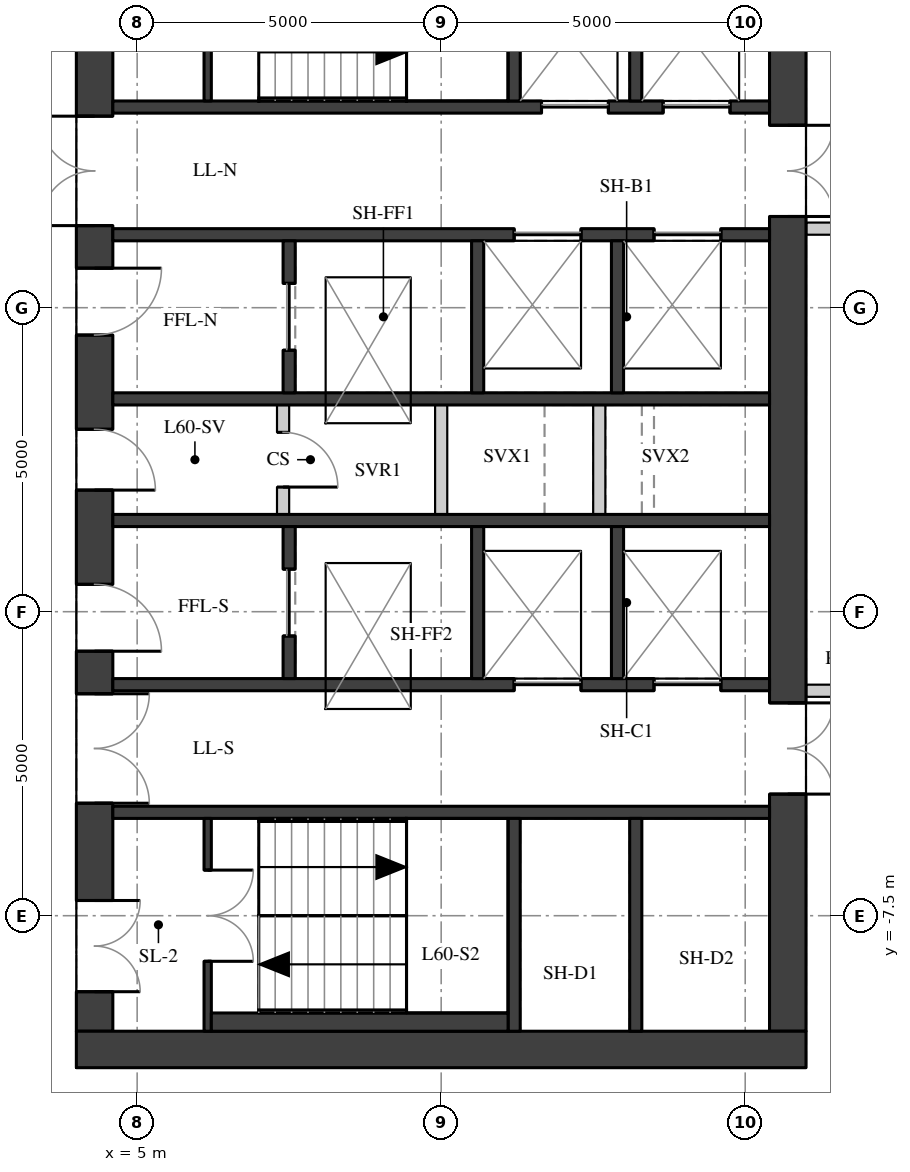
"""IFC4 building model, lengths in metres.
Left out: names, types, materials, properties, quantities, classifications, styles, units other than length and angle.
Written with IfcOpenShell. Run it as: python <this file> out.ifc"""

import sys

from ifc_helpers import new_model, si_unit, direction, frame, frame_2d, origin, place, context, subcontext, project, spatial, rectangle, extrude, element, fill, save


model = new_model("IFC4")
c1 = context("Model", 3, precision=1e-05, world=origin(), true_north=direction((0.0, 1.0)))
c2 = subcontext(c1, "Body", "Model", "MODEL_VIEW")
j1 = project(units=[si_unit("LENGTHUNIT", "METRE"), si_unit("PLANEANGLEUNIT", "RADIAN")], contexts=[c1])
p1 = place(None, origin())
s1 = spatial("IfcSite", under=j1, at=p1, CompositionType="ELEMENT")
p2 = place(p1, origin())
s2 = spatial("IfcBuilding", under=s1, at=p2, CompositionType="ELEMENT")
p3 = place(p2, frame((0.0, 0.0, 212.3)))
s3 = spatial("IfcBuildingStorey", under=s2, at=p3, CompositionType="ELEMENT", Elevation=212.3)
p4 = place(p3, frame((4.3, -9.4, 0.0), z_axis=(0.0, 0.0, 1.0), x_axis=(0.0, 1.0, 0.0)))
e1 = element("IfcWall", 1, at=p4, inside=s3, PredefinedType="SHEAR", context=c2, shape_type="SweptSolid", body=[
    extrude(rectangle(XDim=18.8, YDim=0.6, at=frame_2d((9.4, 0.0))), origin(), (0.0, 0.0, 1.0), 3.02),
])
p5 = place(p4, frame((0.65, 0.0, 0.0)))
e2 = element("IfcOpeningElement", 2, at=p5, cuts=e1, PredefinedType="OPENING", context=c2, shape_type="SweptSolid", body=[
    extrude(rectangle(XDim=1.5, YDim=2.1, at=frame_2d((0.75, 1.05))), frame((0.0, 0.31, 0.0), z_axis=(0.0, -1.0, 0.0), x_axis=(1.0, 0.0, 0.0)), (0.0, 0.0, 1.0), 0.62),
])
p6 = place(p4, frame((3.75, 0.0, 0.0)))
e3 = element("IfcOpeningElement", 3, at=p6, cuts=e1, PredefinedType="OPENING", context=c2, shape_type="SweptSolid", body=[
    extrude(rectangle(XDim=1.8, YDim=2.1, at=frame_2d((0.9, 1.05))), frame((0.0, 0.31, 0.0), z_axis=(0.0, -1.0, 0.0), x_axis=(1.0, 0.0, 0.0)), (0.0, 0.0, 1.0), 0.62),
])
p7 = place(p4, frame((6.25, 0.0, 0.0)))
e4 = element("IfcOpeningElement", 4, at=p7, cuts=e1, PredefinedType="OPENING", context=c2, shape_type="SweptSolid", body=[
    extrude(rectangle(XDim=1.1, YDim=2.1, at=frame_2d((0.55, 1.05))), frame((0.0, 0.31, 0.0), z_axis=(0.0, -1.0, 0.0), x_axis=(1.0, 0.0, 0.0)), (0.0, 0.0, 1.0), 0.62),
])
p8 = place(p4, frame((8.9, 0.0, 0.0)))
e5 = element("IfcOpeningElement", 5, at=p8, cuts=e1, PredefinedType="OPENING", context=c2, shape_type="SweptSolid", body=[
    extrude(rectangle(XDim=1.0, YDim=2.1, at=frame_2d((0.5, 1.05))), frame((0.0, 0.31, 0.0), z_axis=(0.0, -1.0, 0.0), x_axis=(1.0, 0.0, 0.0)), (0.0, 0.0, 1.0), 0.62),
])
p9 = place(p4, frame((11.45, 0.0, 0.0)))
e6 = element("IfcOpeningElement", 6, at=p9, cuts=e1, PredefinedType="OPENING", context=c2, shape_type="SweptSolid", body=[
    extrude(rectangle(XDim=1.1, YDim=2.1, at=frame_2d((0.55, 1.05))), frame((0.0, 0.31, 0.0), z_axis=(0.0, -1.0, 0.0), x_axis=(1.0, 0.0, 0.0)), (0.0, 0.0, 1.0), 0.62),
])
p10 = place(p4, frame((13.25, 0.0, 0.0)))
e7 = element("IfcOpeningElement", 7, at=p10, cuts=e1, PredefinedType="OPENING", context=c2, shape_type="SweptSolid", body=[
    extrude(rectangle(XDim=1.8, YDim=2.1, at=frame_2d((0.9, 1.05))), frame((0.0, 0.31, 0.0), z_axis=(0.0, -1.0, 0.0), x_axis=(1.0, 0.0, 0.0)), (0.0, 0.0, 1.0), 0.62),
])
p11 = place(p4, frame((16.65, 0.0, 0.0)))
e8 = element("IfcOpeningElement", 8, at=p11, cuts=e1, PredefinedType="OPENING", context=c2, shape_type="SweptSolid", body=[
    extrude(rectangle(XDim=1.5, YDim=2.1, at=frame_2d((0.75, 1.05))), frame((0.0, 0.31, 0.0), z_axis=(0.0, -1.0, 0.0), x_axis=(1.0, 0.0, 0.0)), (0.0, 0.0, 1.0), 0.62),
])
p12 = place(p3, frame((15.7, -9.4, 0.0), z_axis=(0.0, 0.0, 1.0), x_axis=(0.0, 1.0, 0.0)))
e9 = element("IfcWall", 9, at=p12, inside=s3, PredefinedType="SHEAR", context=c2, shape_type="SweptSolid", body=[
    extrude(rectangle(XDim=18.8, YDim=0.6, at=frame_2d((9.4, 0.0))), origin(), (0.0, 0.0, 1.0), 3.02),
])
p13 = place(p12, frame((13.4, 0.0, 0.0)))
e10 = element("IfcOpeningElement", 10, at=p13, cuts=e9, PredefinedType="OPENING", context=c2, shape_type="SweptSolid", body=[
    extrude(rectangle(XDim=1.5, YDim=2.1, at=frame_2d((0.75, 1.05))), frame((0.0, 0.31, 0.0), z_axis=(0.0, -1.0, 0.0), x_axis=(1.0, 0.0, 0.0)), (0.0, 0.0, 1.0), 0.62),
])
p14 = place(p12, frame((3.9, 0.0, 0.0)))
e11 = element("IfcOpeningElement", 11, at=p14, cuts=e9, PredefinedType="OPENING", context=c2, shape_type="SweptSolid", body=[
    extrude(rectangle(XDim=1.5, YDim=2.1, at=frame_2d((0.75, 1.05))), frame((0.0, 0.31, 0.0), z_axis=(0.0, -1.0, 0.0), x_axis=(1.0, 0.0, 0.0)), (0.0, 0.0, 1.0), 0.62),
])
p15 = place(p3, frame((4.0, -9.7, 0.0), z_axis=(0.0, 0.0, 1.0), x_axis=(1.0, 0.0, 0.0)))
e12 = element("IfcWall", 12, at=p15, inside=s3, PredefinedType="SHEAR", context=c2, shape_type="SweptSolid", body=[
    extrude(rectangle(XDim=12.0, YDim=0.6, at=frame_2d((6.0, 0.0))), origin(), (0.0, 0.0, 1.0), 3.02),
])
p16 = place(p3, frame((4.6, 5.8, 0.0), z_axis=(0.0, 0.0, 1.0), x_axis=(1.0, 0.0, 0.0)))
e13 = element("IfcWall", 13, at=p16, inside=s3, PredefinedType="SHEAR", context=c2, shape_type="SweptSolid", body=[
    extrude(rectangle(XDim=10.8, YDim=0.2, at=frame_2d((5.4, 0.0))), origin(), (0.0, 0.0, 1.0), 3.02),
])
p17 = place(p16, frame((7.05, 0.0, 0.0)))
e14 = element("IfcOpeningElement", 14, at=p17, cuts=e13, PredefinedType="OPENING", context=c2, shape_type="SweptSolid", body=[
    extrude(rectangle(XDim=1.1, YDim=2.1, at=frame_2d((0.55, 1.05))), frame((0.0, 0.11, 0.0), z_axis=(0.0, -1.0, 0.0), x_axis=(1.0, 0.0, 0.0)), (0.0, 0.0, 1.0), 0.22),
])
p18 = place(p16, frame((9.05, 0.0, 0.0)))
e15 = element("IfcOpeningElement", 15, at=p18, cuts=e13, PredefinedType="OPENING", context=c2, shape_type="SweptSolid", body=[
    extrude(rectangle(XDim=1.1, YDim=2.1, at=frame_2d((0.55, 1.05))), frame((0.0, 0.11, 0.0), z_axis=(0.0, -1.0, 0.0), x_axis=(1.0, 0.0, 0.0)), (0.0, 0.0, 1.0), 0.22),
])
p19 = place(p3, frame((4.6, 3.7, 0.0), z_axis=(0.0, 0.0, 1.0), x_axis=(1.0, 0.0, 0.0)))
e16 = element("IfcWall", 16, at=p19, inside=s3, PredefinedType="SHEAR", context=c2, shape_type="SweptSolid", body=[
    extrude(rectangle(XDim=10.8, YDim=0.2, at=frame_2d((5.4, 0.0))), origin(), (0.0, 0.0, 1.0), 3.02),
])
p20 = place(p19, frame((6.6, 0.0, 0.0)))
e17 = element("IfcOpeningElement", 17, at=p20, cuts=e16, PredefinedType="OPENING", context=c2, shape_type="SweptSolid", body=[
    extrude(rectangle(XDim=1.1, YDim=2.1, at=frame_2d((0.55, 1.05))), frame((0.0, 0.11, 0.0), z_axis=(0.0, -1.0, 0.0), x_axis=(1.0, 0.0, 0.0)), (0.0, 0.0, 1.0), 0.22),
])
p21 = place(p19, frame((8.9, 0.0, 0.0)))
e18 = element("IfcOpeningElement", 18, at=p21, cuts=e16, PredefinedType="OPENING", context=c2, shape_type="SweptSolid", body=[
    extrude(rectangle(XDim=1.1, YDim=2.1, at=frame_2d((0.55, 1.05))), frame((0.0, 0.11, 0.0), z_axis=(0.0, -1.0, 0.0), x_axis=(1.0, 0.0, 0.0)), (0.0, 0.0, 1.0), 0.22),
])
for number, where, z_axis, x_axis in (
    (19, (4.6, 1.0, 0.0), (0.0, 0.0, 1.0), (1.0, 0.0, 0.0)),
    (20, (4.6, -1.0, 0.0), (0.0, 0.0, 1.0), (1.0, 0.0, 0.0)),
):
    element("IfcWall", number, at=place(p3, frame(where, z_axis=z_axis, x_axis=x_axis)), inside=s3, PredefinedType="SHEAR", context=c2, shape_type="SweptSolid", body=[
        extrude(rectangle(XDim=10.8, YDim=0.2, at=frame_2d((5.4, 0.0))), origin(), (0.0, 0.0, 1.0), 3.02),
    ])
p22 = place(p3, frame((4.6, -3.7, 0.0), z_axis=(0.0, 0.0, 1.0), x_axis=(1.0, 0.0, 0.0)))
e21 = element("IfcWall", 21, at=p22, inside=s3, PredefinedType="SHEAR", context=c2, shape_type="SweptSolid", body=[
    extrude(rectangle(XDim=10.8, YDim=0.2, at=frame_2d((5.4, 0.0))), origin(), (0.0, 0.0, 1.0), 3.02),
])
p23 = place(p22, frame((6.6, 0.0, 0.0)))
e22 = element("IfcOpeningElement", 22, at=p23, cuts=e21, PredefinedType="OPENING", context=c2, shape_type="SweptSolid", body=[
    extrude(rectangle(XDim=1.1, YDim=2.1, at=frame_2d((0.55, 1.05))), frame((0.0, 0.11, 0.0), z_axis=(0.0, -1.0, 0.0), x_axis=(1.0, 0.0, 0.0)), (0.0, 0.0, 1.0), 0.22),
])
p24 = place(p22, frame((8.9, 0.0, 0.0)))
e23 = element("IfcOpeningElement", 23, at=p24, cuts=e21, PredefinedType="OPENING", context=c2, shape_type="SweptSolid", body=[
    extrude(rectangle(XDim=1.1, YDim=2.1, at=frame_2d((0.55, 1.05))), frame((0.0, 0.11, 0.0), z_axis=(0.0, -1.0, 0.0), x_axis=(1.0, 0.0, 0.0)), (0.0, 0.0, 1.0), 0.22),
])
p25 = place(p3, frame((4.6, -5.8, 0.0), z_axis=(0.0, 0.0, 1.0), x_axis=(1.0, 0.0, 0.0)))
e24 = element("IfcWall", 24, at=p25, inside=s3, PredefinedType="SHEAR", context=c2, shape_type="SweptSolid", body=[
    extrude(rectangle(XDim=10.8, YDim=0.2, at=frame_2d((5.4, 0.0))), origin(), (0.0, 0.0, 1.0), 3.02),
])
for number, where, z_axis, x_axis in (
    (25, (11.2, 5.9, 0.0), (0.0, 0.0, 1.0), (0.0, 1.0, 0.0)),
    (26, (11.2, -9.4, 0.0), (0.0, 0.0, 1.0), (0.0, 1.0, 0.0)),
    (27, (13.2, 5.9, 0.0), (0.0, 0.0, 1.0), (0.0, 1.0, 0.0)),
    (28, (13.2, -9.4, 0.0), (0.0, 0.0, 1.0), (0.0, 1.0, 0.0)),
):
    element("IfcWall", number, at=place(p3, frame(where, z_axis=z_axis, x_axis=x_axis)), inside=s3, PredefinedType="SHEAR", context=c2, shape_type="SweptSolid", body=[
        extrude(rectangle(XDim=3.5, YDim=0.2, at=frame_2d((1.75, 0.0))), origin(), (0.0, 0.0, 1.0), 3.02),
    ])
p26 = place(p3, frame((7.5, 1.1, 0.0), z_axis=(0.0, 0.0, 1.0), x_axis=(0.0, 1.0, 0.0)))
e29 = element("IfcWall", 29, at=p26, inside=s3, PredefinedType="SHEAR", context=c2, shape_type="SweptSolid", body=[
    extrude(rectangle(XDim=2.5, YDim=0.2, at=frame_2d((1.25, 0.0))), origin(), (0.0, 0.0, 1.0), 3.02),
])
p27 = place(p26, frame((0.7, 0.0, 0.0)))
e30 = element("IfcOpeningElement", 30, at=p27, cuts=e29, PredefinedType="OPENING", context=c2, shape_type="SweptSolid", body=[
    extrude(rectangle(XDim=1.1, YDim=2.1, at=frame_2d((0.55, 1.05))), frame((0.0, 0.11, 0.0), z_axis=(0.0, -1.0, 0.0), x_axis=(1.0, 0.0, 0.0)), (0.0, 0.0, 1.0), 0.22),
])
p28 = place(p3, frame((7.5, -3.6, 0.0), z_axis=(0.0, 0.0, 1.0), x_axis=(0.0, 1.0, 0.0)))
e31 = element("IfcWall", 31, at=p28, inside=s3, PredefinedType="SHEAR", context=c2, shape_type="SweptSolid", body=[
    extrude(rectangle(XDim=2.5, YDim=0.2, at=frame_2d((1.25, 0.0))), origin(), (0.0, 0.0, 1.0), 3.02),
])
p29 = place(p28, frame((0.7, 0.0, 0.0)))
e32 = element("IfcOpeningElement", 32, at=p29, cuts=e31, PredefinedType="OPENING", context=c2, shape_type="SweptSolid", body=[
    extrude(rectangle(XDim=1.1, YDim=2.1, at=frame_2d((0.55, 1.05))), frame((0.0, 0.11, 0.0), z_axis=(0.0, -1.0, 0.0), x_axis=(1.0, 0.0, 0.0)), (0.0, 0.0, 1.0), 0.22),
])
for number, where, z_axis, x_axis in (
    (33, (10.6, 1.1, 0.0), (0.0, 0.0, 1.0), (0.0, 1.0, 0.0)),
    (34, (10.6, -3.6, 0.0), (0.0, 0.0, 1.0), (0.0, 1.0, 0.0)),
    (35, (12.9, 1.1, 0.0), (0.0, 0.0, 1.0), (0.0, 1.0, 0.0)),
    (36, (12.9, -3.6, 0.0), (0.0, 0.0, 1.0), (0.0, 1.0, 0.0)),
):
    element("IfcWall", number, at=place(p3, frame(where, z_axis=z_axis, x_axis=x_axis)), inside=s3, PredefinedType="SHEAR", context=c2, shape_type="SweptSolid", body=[
        extrude(rectangle(XDim=2.5, YDim=0.2, at=frame_2d((1.25, 0.0))), origin(), (0.0, 0.0, 1.0), 3.02),
    ])
p30 = place(p3, frame((6.16, 5.9, 0.0), z_axis=(0.0, 0.0, 1.0), x_axis=(0.0, 1.0, 0.0)))
e37 = element("IfcWall", 37, at=p30, inside=s3, PredefinedType="SHEAR", context=c2, shape_type="SweptSolid", body=[
    extrude(rectangle(XDim=3.5, YDim=0.12, at=frame_2d((1.75, 0.0))), origin(), (0.0, 0.0, 1.0), 3.02),
])
p31 = place(p30, frame((0.85, 0.0, 0.0)))
e38 = element("IfcOpeningElement", 38, at=p31, cuts=e37, PredefinedType="OPENING", context=c2, shape_type="SweptSolid", body=[
    extrude(rectangle(XDim=1.5, YDim=2.1, at=frame_2d((0.75, 1.05))), frame((0.0, 0.07, 0.0), z_axis=(0.0, -1.0, 0.0), x_axis=(1.0, 0.0, 0.0)), (0.0, 0.0, 1.0), 0.14),
])
p32 = place(p3, frame((6.16, -9.4, 0.0), z_axis=(0.0, 0.0, 1.0), x_axis=(0.0, 1.0, 0.0)))
e39 = element("IfcWall", 39, at=p32, inside=s3, PredefinedType="SHEAR", context=c2, shape_type="SweptSolid", body=[
    extrude(rectangle(XDim=3.5, YDim=0.12, at=frame_2d((1.75, 0.0))), origin(), (0.0, 0.0, 1.0), 3.02),
])
p33 = place(p32, frame((1.15, 0.0, 0.0)))
e40 = element("IfcOpeningElement", 40, at=p33, cuts=e39, PredefinedType="OPENING", context=c2, shape_type="SweptSolid", body=[
    extrude(rectangle(XDim=1.5, YDim=2.1, at=frame_2d((0.75, 1.05))), frame((0.0, 0.07, 0.0), z_axis=(0.0, -1.0, 0.0), x_axis=(1.0, 0.0, 0.0)), (0.0, 0.0, 1.0), 0.14),
])
p34 = place(p3, frame((7.4, -0.9, 0.0), z_axis=(0.0, 0.0, 1.0), x_axis=(0.0, 1.0, 0.0)))
e41 = element("IfcWall", 41, at=p34, inside=s3, PredefinedType="PARTITIONING", context=c2, shape_type="SweptSolid", body=[
    extrude(rectangle(XDim=1.8, YDim=0.2, at=frame_2d((0.9, 0.0))), origin(), (0.0, 0.0, 1.0), 3.02),
])
p35 = place(p34, frame((0.45, 0.0, 0.0)))
e42 = element("IfcOpeningElement", 42, at=p35, cuts=e41, PredefinedType="OPENING", context=c2, shape_type="SweptSolid", body=[
    extrude(rectangle(XDim=0.9, YDim=2.1, at=frame_2d((0.45, 1.05))), frame((0.0, 0.11, 0.0), z_axis=(0.0, -1.0, 0.0), x_axis=(1.0, 0.0, 0.0)), (0.0, 0.0, 1.0), 0.22),
])
for number, where, z_axis, x_axis in (
    (43, (10.0, -0.9, 0.0), (0.0, 0.0, 1.0), (0.0, 1.0, 0.0)),
    (44, (12.6, -0.9, 0.0), (0.0, 0.0, 1.0), (0.0, 1.0, 0.0)),
):
    element("IfcWall", number, at=place(p3, frame(where, z_axis=z_axis, x_axis=x_axis)), inside=s3, PredefinedType="PARTITIONING", context=c2, shape_type="SweptSolid", body=[
        extrude(rectangle(XDim=1.8, YDim=0.2, at=frame_2d((0.9, 0.0))), origin(), (0.0, 0.0, 1.0), 3.02),
    ])
p36 = place(p3, frame((6.22, -9.25, 0.0), z_axis=(0.0, 0.0, 1.0), x_axis=(1.0, 0.0, 0.0)))
e45 = element("IfcWall", 45, at=p36, inside=s3, PredefinedType="PARTITIONING", context=c2, shape_type="SweptSolid", body=[
    extrude(rectangle(XDim=4.88, YDim=0.3, at=frame_2d((2.44, 0.0))), origin(), (0.0, 0.0, 1.0), 3.02),
])
p37 = place(p3, frame((17.5, 3.8, 0.0), z_axis=(0.0, 0.0, 1.0), x_axis=(-1.0, 0.0, 0.0)))
e46 = element("IfcWall", 46, at=p37, inside=s3, PredefinedType="PARTITIONING", context=c2, shape_type="SweptSolid", body=[
    extrude(rectangle(XDim=1.496, YDim=0.2, at=frame_2d((0.748, 0.0))), origin(), (0.0, 0.0, 1.0), 3.02),
])
p38 = place(p3, frame((16.004, -3.8, 0.0), z_axis=(0.0, 0.0, 1.0), x_axis=(1.0, 0.0, 0.0)))
e47 = element("IfcWall", 47, at=p38, inside=s3, PredefinedType="PARTITIONING", context=c2, shape_type="SweptSolid", body=[
    extrude(rectangle(XDim=1.496, YDim=0.2, at=frame_2d((0.748, 0.0))), origin(), (0.0, 0.0, 1.0), 2.47),
])
p39 = place(p5, origin())
e48 = element("IfcDoor", 48, at=p39, inside=s3, OperationType="DOUBLE_DOOR_SINGLE_SWING", PredefinedType="DOOR", context=c2, shape_type="SweptSolid", body=[
    extrude(rectangle(XDim=1.5, YDim=2.1, at=frame_2d((0.75, 1.05))), frame((0.0, 0.025, 0.0), z_axis=(0.0, -1.0, 0.0), x_axis=(1.0, 0.0, 0.0)), (0.0, 0.0, 1.0), 0.05),
])
fill(e2, e48)
p40 = place(p6, origin())
e49 = element("IfcDoor", 49, at=p40, inside=s3, OperationType="DOUBLE_DOOR_SINGLE_SWING", PredefinedType="DOOR", context=c2, shape_type="SweptSolid", body=[
    extrude(rectangle(XDim=1.8, YDim=2.1, at=frame_2d((0.9, 1.05))), frame((0.0, 0.025, 0.0), z_axis=(0.0, -1.0, 0.0), x_axis=(1.0, 0.0, 0.0)), (0.0, 0.0, 1.0), 0.05),
])
fill(e3, e49)
p41 = place(p7, origin())
e50 = element("IfcDoor", 50, at=p41, inside=s3, OperationType="SINGLE_SWING_RIGHT", PredefinedType="DOOR", context=c2, shape_type="SweptSolid", body=[
    extrude(rectangle(XDim=1.1, YDim=2.1, at=frame_2d((0.55, 1.05))), frame((0.0, 0.025, 0.0), z_axis=(0.0, -1.0, 0.0), x_axis=(1.0, 0.0, 0.0)), (0.0, 0.0, 1.0), 0.05),
])
fill(e4, e50)
p42 = place(p8, origin())
e51 = element("IfcDoor", 51, at=p42, inside=s3, OperationType="SINGLE_SWING_RIGHT", PredefinedType="DOOR", context=c2, shape_type="SweptSolid", body=[
    extrude(rectangle(XDim=1.0, YDim=2.1, at=frame_2d((0.5, 1.05))), frame((0.0, 0.025, 0.0), z_axis=(0.0, -1.0, 0.0), x_axis=(1.0, 0.0, 0.0)), (0.0, 0.0, 1.0), 0.05),
])
fill(e5, e51)
p43 = place(p9, origin())
e52 = element("IfcDoor", 52, at=p43, inside=s3, OperationType="SINGLE_SWING_LEFT", PredefinedType="DOOR", context=c2, shape_type="SweptSolid", body=[
    extrude(rectangle(XDim=1.1, YDim=2.1, at=frame_2d((0.55, 1.05))), frame((0.0, 0.025, 0.0), z_axis=(0.0, -1.0, 0.0), x_axis=(1.0, 0.0, 0.0)), (0.0, 0.0, 1.0), 0.05),
])
fill(e6, e52)
p44 = place(p10, origin())
e53 = element("IfcDoor", 53, at=p44, inside=s3, OperationType="DOUBLE_DOOR_SINGLE_SWING", PredefinedType="DOOR", context=c2, shape_type="SweptSolid", body=[
    extrude(rectangle(XDim=1.8, YDim=2.1, at=frame_2d((0.9, 1.05))), frame((0.0, 0.025, 0.0), z_axis=(0.0, -1.0, 0.0), x_axis=(1.0, 0.0, 0.0)), (0.0, 0.0, 1.0), 0.05),
])
fill(e7, e53)
p45 = place(p13, origin())
e54 = element("IfcDoor", 54, at=p45, inside=s3, OperationType="DOUBLE_DOOR_SINGLE_SWING", PredefinedType="DOOR", context=c2, shape_type="SweptSolid", body=[
    extrude(rectangle(XDim=1.5, YDim=2.1, at=frame_2d((0.75, 1.05))), frame((0.0, 0.025, 0.0), z_axis=(0.0, -1.0, 0.0), x_axis=(1.0, 0.0, 0.0)), (0.0, 0.0, 1.0), 0.05),
])
fill(e10, e54)
p46 = place(p14, origin())
e55 = element("IfcDoor", 55, at=p46, inside=s3, OperationType="DOUBLE_DOOR_SINGLE_SWING", PredefinedType="DOOR", context=c2, shape_type="SweptSolid", body=[
    extrude(rectangle(XDim=1.5, YDim=2.1, at=frame_2d((0.75, 1.05))), frame((0.0, 0.025, 0.0), z_axis=(0.0, -1.0, 0.0), x_axis=(1.0, 0.0, 0.0)), (0.0, 0.0, 1.0), 0.05),
])
fill(e11, e55)
p47 = place(p33, origin())
e56 = element("IfcDoor", 56, at=p47, inside=s3, OperationType="DOUBLE_DOOR_SINGLE_SWING", PredefinedType="DOOR", context=c2, shape_type="SweptSolid", body=[
    extrude(rectangle(XDim=1.5, YDim=2.1, at=frame_2d((0.75, 1.05))), frame((0.0, 0.025, 0.0), z_axis=(0.0, -1.0, 0.0), x_axis=(1.0, 0.0, 0.0)), (0.0, 0.0, 1.0), 0.05),
])
fill(e40, e56)
p48 = place(p17, origin())
e57 = element("IfcDoor", 57, at=p48, inside=s3, OperationType="DOUBLE_DOOR_SLIDING", PredefinedType="DOOR", context=c2, shape_type="SweptSolid", body=[
    extrude(rectangle(XDim=1.1, YDim=2.1, at=frame_2d((0.55, 1.05))), frame((0.0, 0.025, 0.0), z_axis=(0.0, -1.0, 0.0), x_axis=(1.0, 0.0, 0.0)), (0.0, 0.0, 1.0), 0.05),
])
fill(e14, e57)
p49 = place(p18, origin())
e58 = element("IfcDoor", 58, at=p49, inside=s3, OperationType="DOUBLE_DOOR_SLIDING", PredefinedType="DOOR", context=c2, shape_type="SweptSolid", body=[
    extrude(rectangle(XDim=1.1, YDim=2.1, at=frame_2d((0.55, 1.05))), frame((0.0, 0.025, 0.0), z_axis=(0.0, -1.0, 0.0), x_axis=(1.0, 0.0, 0.0)), (0.0, 0.0, 1.0), 0.05),
])
fill(e15, e58)
p50 = place(p20, origin())
e59 = element("IfcDoor", 59, at=p50, inside=s3, OperationType="DOUBLE_DOOR_SLIDING", PredefinedType="DOOR", context=c2, shape_type="SweptSolid", body=[
    extrude(rectangle(XDim=1.1, YDim=2.1, at=frame_2d((0.55, 1.05))), frame((0.0, 0.025, 0.0), z_axis=(0.0, -1.0, 0.0), x_axis=(1.0, 0.0, 0.0)), (0.0, 0.0, 1.0), 0.05),
])
fill(e17, e59)
p51 = place(p21, origin())
e60 = element("IfcDoor", 60, at=p51, inside=s3, OperationType="DOUBLE_DOOR_SLIDING", PredefinedType="DOOR", context=c2, shape_type="SweptSolid", body=[
    extrude(rectangle(XDim=1.1, YDim=2.1, at=frame_2d((0.55, 1.05))), frame((0.0, 0.025, 0.0), z_axis=(0.0, -1.0, 0.0), x_axis=(1.0, 0.0, 0.0)), (0.0, 0.0, 1.0), 0.05),
])
fill(e18, e60)
p52 = place(p23, origin())
e61 = element("IfcDoor", 61, at=p52, inside=s3, OperationType="DOUBLE_DOOR_SLIDING", PredefinedType="DOOR", context=c2, shape_type="SweptSolid", body=[
    extrude(rectangle(XDim=1.1, YDim=2.1, at=frame_2d((0.55, 1.05))), frame((0.0, 0.025, 0.0), z_axis=(0.0, -1.0, 0.0), x_axis=(1.0, 0.0, 0.0)), (0.0, 0.0, 1.0), 0.05),
])
fill(e22, e61)
p53 = place(p24, origin())
e62 = element("IfcDoor", 62, at=p53, inside=s3, OperationType="DOUBLE_DOOR_SLIDING", PredefinedType="DOOR", context=c2, shape_type="SweptSolid", body=[
    extrude(rectangle(XDim=1.1, YDim=2.1, at=frame_2d((0.55, 1.05))), frame((0.0, 0.025, 0.0), z_axis=(0.0, -1.0, 0.0), x_axis=(1.0, 0.0, 0.0)), (0.0, 0.0, 1.0), 0.05),
])
fill(e23, e62)
p54 = place(p27, origin())
e63 = element("IfcDoor", 63, at=p54, inside=s3, OperationType="DOUBLE_DOOR_SLIDING", PredefinedType="DOOR", context=c2, shape_type="SweptSolid", body=[
    extrude(rectangle(XDim=1.1, YDim=2.1, at=frame_2d((0.55, 1.05))), frame((0.0, 0.025, 0.0), z_axis=(0.0, -1.0, 0.0), x_axis=(1.0, 0.0, 0.0)), (0.0, 0.0, 1.0), 0.05),
])
fill(e30, e63)
p55 = place(p29, origin())
e64 = element("IfcDoor", 64, at=p55, inside=s3, OperationType="DOUBLE_DOOR_SLIDING", PredefinedType="DOOR", context=c2, shape_type="SweptSolid", body=[
    extrude(rectangle(XDim=1.1, YDim=2.1, at=frame_2d((0.55, 1.05))), frame((0.0, 0.025, 0.0), z_axis=(0.0, -1.0, 0.0), x_axis=(1.0, 0.0, 0.0)), (0.0, 0.0, 1.0), 0.05),
])
fill(e32, e64)
p56 = place(p35, origin())
e65 = element("IfcDoor", 65, at=p56, inside=s3, OperationType="SINGLE_SWING_RIGHT", PredefinedType="DOOR", context=c2, shape_type="SweptSolid", body=[
    extrude(rectangle(XDim=0.9, YDim=2.1, at=frame_2d((0.45, 1.05))), frame((0.0, 0.025, 0.0), z_axis=(0.0, -1.0, 0.0), x_axis=(1.0, 0.0, 0.0)), (0.0, 0.0, 1.0), 0.05),
])
fill(e42, e65)
save(model, sys.argv[1])
